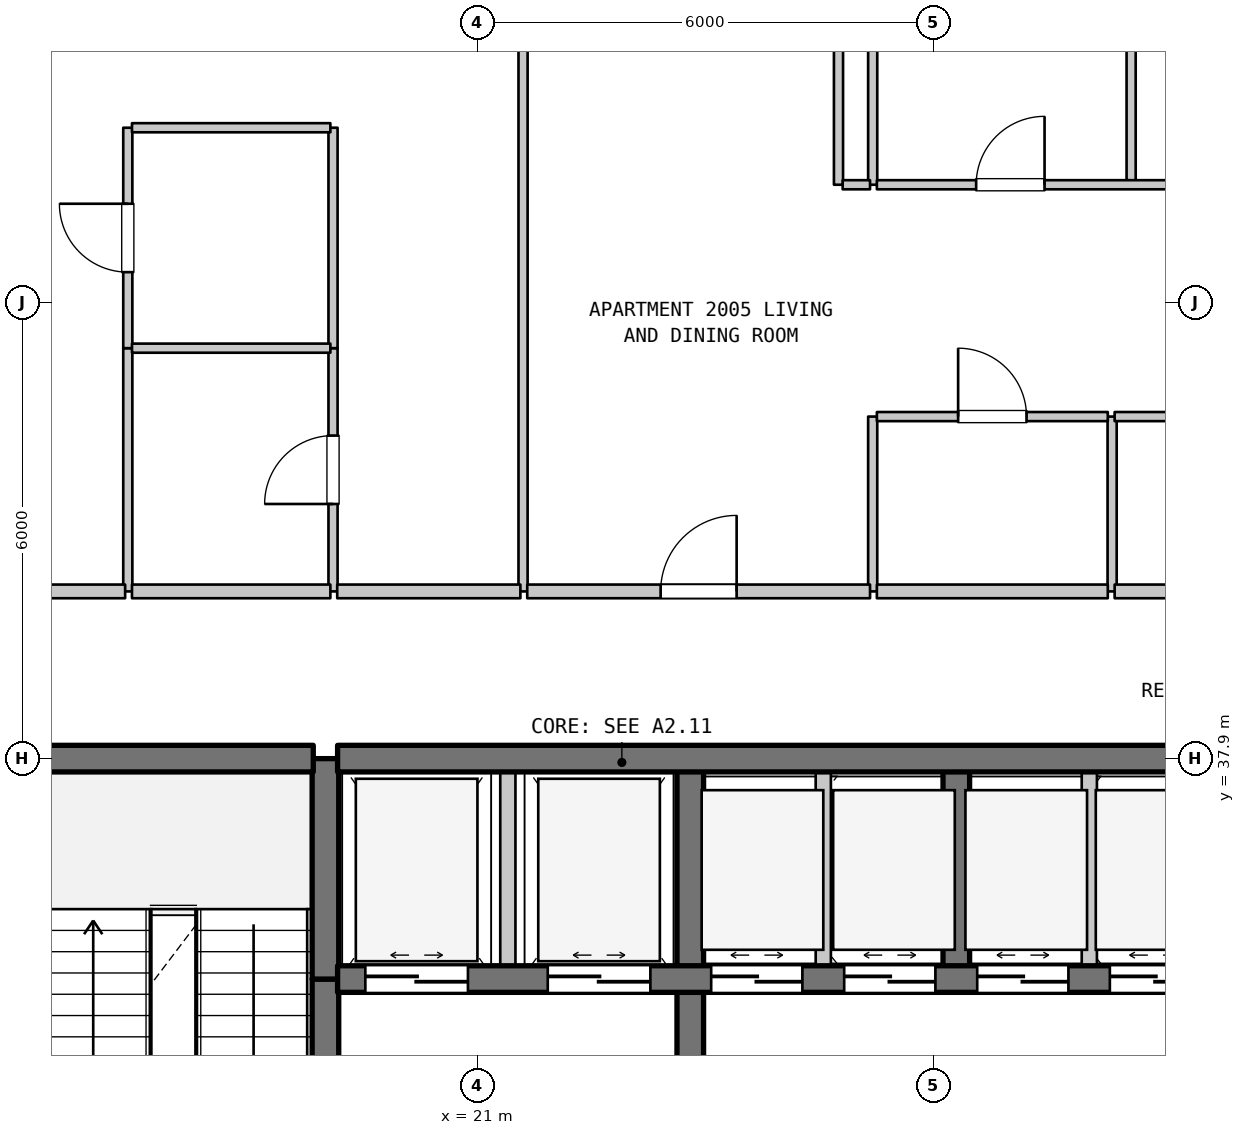
"""IFC4 building model, lengths in metres.
Left out: names, types, materials, properties, quantities, classifications, styles, units other than length and angle.
Written with IfcOpenShell. Run it as: python <this file> out.ifc"""

import sys

from ifc_helpers import new_model, si_unit, direction, frame, frame_2d, origin, place, context, subcontext, project, spatial, rectangle, extrude, element, fill, save


model = new_model("IFC4")
c1 = context("Model", 3, precision=1e-05, world=origin(), true_north=direction((0.0, 1.0)))
c2 = subcontext(c1, "Body", "Model", "MODEL_VIEW")
j1 = project(units=[si_unit("LENGTHUNIT", "METRE"), si_unit("PLANEANGLEUNIT", "RADIAN")], contexts=[c1])
p1 = place(None, origin())
s1 = spatial("IfcSite", under=j1, at=p1, CompositionType="ELEMENT")
p2 = place(p1, origin())
s2 = spatial("IfcBuilding", under=s1, at=p2, CompositionType="ELEMENT")
p3 = place(p2, frame((0.0, 0.0, 86.4)))
s3 = spatial("IfcBuildingStorey", under=s2, at=p3, CompositionType="ELEMENT", Elevation=86.4)
p4 = place(p3, frame((16.4, 40.1, 0.0), z_axis=(0.0, 0.0, 1.0), x_axis=(0.0, 1.0, 0.0)))
e1 = element("IfcWall", 1, at=p4, inside=s3, PredefinedType="PARTITIONING", context=c2, shape_type="SweptSolid", body=[
    extrude(rectangle(XDim=3.2, YDim=0.12, at=frame_2d((1.6, 0.0))), origin(), (0.0, 0.0, 1.0), 4.185),
])
p5 = place(p3, frame((16.4, 43.3, 0.0), z_axis=(0.0, 0.0, 1.0), x_axis=(0.0, 1.0, 0.0)))
e2 = element("IfcWall", 2, at=p5, inside=s3, PredefinedType="PARTITIONING", context=c2, shape_type="SweptSolid", body=[
    extrude(rectangle(XDim=2.9, YDim=0.12, at=frame_2d((1.45, 0.0))), origin(), (0.0, 0.0, 1.0), 4.185),
])
p6 = place(p5, frame((1.0, 0.0, 0.0)))
e3 = element("IfcOpeningElement", 3, at=p6, cuts=e2, PredefinedType="OPENING", context=c2, shape_type="SweptSolid", body=[
    extrude(rectangle(XDim=0.9, YDim=2.1, at=frame_2d((0.45, 1.05))), frame((0.0, 0.07, 0.0), z_axis=(0.0, -1.0, 0.0), x_axis=(1.0, 0.0, 0.0)), (0.0, 0.0, 1.0), 0.14),
])
p7 = place(p3, frame((19.0, 29.5, 0.0), z_axis=(0.0, 0.0, 1.0), x_axis=(0.0, 1.0, 0.0)))
e4 = element("IfcWall", 4, at=p7, inside=s3, PredefinedType="SHEAR", context=c2, shape_type="SweptSolid", body=[
    extrude(rectangle(XDim=5.5, YDim=0.35, at=frame_2d((2.75, 0.0))), origin(), (0.0, 0.0, 1.0), 4.185),
])
p8 = place(p7, frame((2.025, 0.0, 0.0)))
e5 = element("IfcOpeningElement", 5, at=p8, cuts=e4, PredefinedType="OPENING", context=c2, shape_type="SweptSolid", body=[
    extrude(rectangle(XDim=1.1, YDim=2.15, at=frame_2d((0.55, 1.075))), frame((0.0, 0.185, 0.0), z_axis=(0.0, -1.0, 0.0), x_axis=(1.0, 0.0, 0.0)), (0.0, 0.0, 1.0), 0.37),
])
p9 = place(p3, frame((19.0, 35.0, 0.0), z_axis=(0.0, 0.0, 1.0), x_axis=(0.0, 1.0, 0.0)))
e6 = element("IfcWall", 6, at=p9, inside=s3, PredefinedType="SHEAR", context=c2, shape_type="SweptSolid", body=[
    extrude(rectangle(XDim=2.9, YDim=0.35, at=frame_2d((1.45, 0.0))), origin(), (0.0, 0.0, 1.0), 4.185),
])
p10 = place(p3, frame((19.1, 40.1, 0.0), z_axis=(0.0, 0.0, 1.0), x_axis=(0.0, 1.0, 0.0)))
e7 = element("IfcWall", 7, at=p10, inside=s3, PredefinedType="PARTITIONING", context=c2, shape_type="SweptSolid", body=[
    extrude(rectangle(XDim=3.2, YDim=0.12, at=frame_2d((1.6, 0.0))), origin(), (0.0, 0.0, 1.0), 4.185),
])
p11 = place(p10, frame((1.15, 0.0, 0.0)))
e8 = element("IfcOpeningElement", 8, at=p11, cuts=e7, PredefinedType="OPENING", context=c2, shape_type="SweptSolid", body=[
    extrude(rectangle(XDim=0.9, YDim=2.15, at=frame_2d((0.45, 1.075))), frame((0.0, 0.07, 0.0), z_axis=(0.0, -1.0, 0.0), x_axis=(1.0, 0.0, 0.0)), (0.0, 0.0, 1.0), 0.14),
])
p12 = place(p3, frame((19.1, 43.3, 0.0), z_axis=(0.0, 0.0, 1.0), x_axis=(0.0, 1.0, 0.0)))
e9 = element("IfcWall", 9, at=p12, inside=s3, PredefinedType="PARTITIONING", context=c2, shape_type="SweptSolid", body=[
    extrude(rectangle(XDim=2.9, YDim=0.12, at=frame_2d((1.45, 0.0))), origin(), (0.0, 0.0, 1.0), 4.185),
])
p13 = place(p3, frame((21.4, 35.0, 0.0), z_axis=(0.0, 0.0, 1.0), x_axis=(0.0, 1.0, 0.0)))
e10 = element("IfcWall", 10, at=p13, inside=s3, PredefinedType="STANDARD", context=c2, shape_type="SweptSolid", body=[
    extrude(rectangle(XDim=2.9, YDim=0.2, at=frame_2d((1.45, 0.0))), origin(), (0.0, 0.0, 1.0), 4.185),
])
p14 = place(p3, frame((21.6, 40.1, 0.0), z_axis=(0.0, 0.0, 1.0), x_axis=(0.0, 1.0, 0.0)))
e11 = element("IfcWall", 11, at=p14, inside=s3, PredefinedType="PARTITIONING", context=c2, shape_type="SweptSolid", body=[
    extrude(rectangle(XDim=13.79, YDim=0.12, at=frame_2d((6.895, 0.0))), origin(), (0.0, 0.0, 1.0), 4.185),
])
p15 = place(p3, frame((23.8, 31.5, 0.0), z_axis=(0.0, 0.0, 1.0), x_axis=(0.0, 1.0, 0.0)))
e12 = element("IfcWall", 12, at=p15, inside=s3, PredefinedType="SHEAR", context=c2, shape_type="SweptSolid", body=[
    extrude(rectangle(XDim=3.5, YDim=0.35, at=frame_2d((1.75, 0.0))), origin(), (0.0, 0.0, 1.0), 4.185),
])
p16 = place(p15, frame((1.127, 0.0, 0.0)))
e13 = element("IfcOpeningElement", 13, at=p16, cuts=e12, PredefinedType="OPENING", context=c2, shape_type="SweptSolid", body=[
    extrude(rectangle(XDim=1.1, YDim=2.15, at=frame_2d((0.55, 1.075))), frame((0.0, 0.185, 0.0), z_axis=(0.0, -1.0, 0.0), x_axis=(1.0, 0.0, 0.0)), (0.0, 0.0, 1.0), 0.37),
])
p17 = place(p3, frame((23.8, 35.0, 0.0), z_axis=(0.0, 0.0, 1.0), x_axis=(0.0, 1.0, 0.0)))
e14 = element("IfcWall", 14, at=p17, inside=s3, PredefinedType="SHEAR", context=c2, shape_type="SweptSolid", body=[
    extrude(rectangle(XDim=2.9, YDim=0.35, at=frame_2d((1.45, 0.0))), origin(), (0.0, 0.0, 1.0), 4.185),
])
p18 = place(p3, frame((25.55, 35.0, 0.0), z_axis=(0.0, 0.0, 1.0), x_axis=(0.0, 1.0, 0.0)))
e15 = element("IfcWall", 15, at=p18, inside=s3, PredefinedType="STANDARD", context=c2, shape_type="SweptSolid", body=[
    extrude(rectangle(XDim=2.9, YDim=0.2, at=frame_2d((1.45, 0.0))), origin(), (0.0, 0.0, 1.0), 4.185),
])
p19 = place(p3, frame((25.75, 45.45, 0.0), z_axis=(0.0, 0.0, 1.0), x_axis=(0.0, 1.0, 0.0)))
e16 = element("IfcWall", 16, at=p19, inside=s3, PredefinedType="PARTITIONING", context=c2, shape_type="SweptSolid", body=[
    extrude(rectangle(XDim=8.44, YDim=0.12, at=frame_2d((4.22, 0.0))), origin(), (0.0, 0.0, 1.0), 4.185),
])
p20 = place(p3, frame((26.2, 40.1, 0.0), z_axis=(0.0, 0.0, 1.0), x_axis=(0.0, 1.0, 0.0)))
e17 = element("IfcWall", 17, at=p20, inside=s3, PredefinedType="PARTITIONING", context=c2, shape_type="SweptSolid", body=[
    extrude(rectangle(XDim=2.3, YDim=0.12, at=frame_2d((1.15, 0.0))), origin(), (0.0, 0.0, 1.0), 4.185),
])
p21 = place(p3, frame((26.2, 45.45, 0.0), z_axis=(0.0, 0.0, 1.0), x_axis=(0.0, 1.0, 0.0)))
e18 = element("IfcWall", 18, at=p21, inside=s3, PredefinedType="PARTITIONING", context=c2, shape_type="SweptSolid", body=[
    extrude(rectangle(XDim=8.44, YDim=0.12, at=frame_2d((4.22, 0.0))), origin(), (0.0, 0.0, 1.0), 4.185),
])
p22 = place(p3, frame((27.3, 35.0, 0.0), z_axis=(0.0, 0.0, 1.0), x_axis=(0.0, 1.0, 0.0)))
e19 = element("IfcWall", 19, at=p22, inside=s3, PredefinedType="SHEAR", context=c2, shape_type="SweptSolid", body=[
    extrude(rectangle(XDim=2.9, YDim=0.35, at=frame_2d((1.45, 0.0))), origin(), (0.0, 0.0, 1.0), 4.185),
])
p23 = place(p3, frame((29.05, 35.0, 0.0), z_axis=(0.0, 0.0, 1.0), x_axis=(0.0, 1.0, 0.0)))
e20 = element("IfcWall", 20, at=p23, inside=s3, PredefinedType="STANDARD", context=c2, shape_type="SweptSolid", body=[
    extrude(rectangle(XDim=2.9, YDim=0.2, at=frame_2d((1.45, 0.0))), origin(), (0.0, 0.0, 1.0), 4.185),
])
p24 = place(p3, frame((29.35, 40.1, 0.0), z_axis=(0.0, 0.0, 1.0), x_axis=(0.0, 1.0, 0.0)))
e21 = element("IfcWall", 21, at=p24, inside=s3, PredefinedType="PARTITIONING", context=c2, shape_type="SweptSolid", body=[
    extrude(rectangle(XDim=2.3, YDim=0.12, at=frame_2d((1.15, 0.0))), origin(), (0.0, 0.0, 1.0), 4.185),
])
p25 = place(p3, frame((29.6, 45.45, 0.0), z_axis=(0.0, 0.0, 1.0), x_axis=(0.0, 1.0, 0.0)))
e22 = element("IfcWall", 22, at=p25, inside=s3, PredefinedType="PARTITIONING", context=c2, shape_type="SweptSolid", body=[
    extrude(rectangle(XDim=8.44, YDim=0.12, at=frame_2d((4.22, 0.0))), origin(), (0.0, 0.0, 1.0), 4.185),
])
p26 = place(p3, frame((19.16, 35.0, 0.0), z_axis=(0.0, 0.0, 1.0), x_axis=(1.0, 0.0, 0.0)))
e23 = element("IfcWall", 23, at=p26, inside=s3, PredefinedType="SHEAR", context=c2, shape_type="SweptSolid", body=[
    extrude(rectangle(XDim=11.48, YDim=0.35, at=frame_2d((5.74, 0.0))), origin(), (0.0, 0.0, 1.0), 4.185),
])
p27 = place(p26, frame((0.365, 0.0, 0.0)))
e24 = element("IfcOpeningElement", 24, at=p27, cuts=e23, PredefinedType="OPENING", context=c2, shape_type="SweptSolid", body=[
    extrude(rectangle(XDim=1.35, YDim=2.2, at=frame_2d((0.675, 1.1))), frame((0.0, 0.185, 0.0), z_axis=(0.0, -1.0, 0.0), x_axis=(1.0, 0.0, 0.0)), (0.0, 0.0, 1.0), 0.37),
])
p28 = place(p26, frame((2.765, 0.0, 0.0)))
e25 = element("IfcOpeningElement", 25, at=p28, cuts=e23, PredefinedType="OPENING", context=c2, shape_type="SweptSolid", body=[
    extrude(rectangle(XDim=1.35, YDim=2.2, at=frame_2d((0.675, 1.1))), frame((0.0, 0.185, 0.0), z_axis=(0.0, -1.0, 0.0), x_axis=(1.0, 0.0, 0.0)), (0.0, 0.0, 1.0), 0.37),
])
p29 = place(p26, frame((4.915, 0.0, 0.0)))
e26 = element("IfcOpeningElement", 26, at=p29, cuts=e23, PredefinedType="OPENING", context=c2, shape_type="SweptSolid", body=[
    extrude(rectangle(XDim=1.2, YDim=2.2, at=frame_2d((0.6, 1.1))), frame((0.0, 0.185, 0.0), z_axis=(0.0, -1.0, 0.0), x_axis=(1.0, 0.0, 0.0)), (0.0, 0.0, 1.0), 0.37),
])
p30 = place(p26, frame((6.665, 0.0, 0.0)))
e27 = element("IfcOpeningElement", 27, at=p30, cuts=e23, PredefinedType="OPENING", context=c2, shape_type="SweptSolid", body=[
    extrude(rectangle(XDim=1.2, YDim=2.2, at=frame_2d((0.6, 1.1))), frame((0.0, 0.185, 0.0), z_axis=(0.0, -1.0, 0.0), x_axis=(1.0, 0.0, 0.0)), (0.0, 0.0, 1.0), 0.37),
])
p31 = place(p26, frame((8.415, 0.0, 0.0)))
e28 = element("IfcOpeningElement", 28, at=p31, cuts=e23, PredefinedType="OPENING", context=c2, shape_type="SweptSolid", body=[
    extrude(rectangle(XDim=1.2, YDim=2.2, at=frame_2d((0.6, 1.1))), frame((0.0, 0.185, 0.0), z_axis=(0.0, -1.0, 0.0), x_axis=(1.0, 0.0, 0.0)), (0.0, 0.0, 1.0), 0.37),
])
p32 = place(p26, frame((10.16, 0.0, 0.0)))
e29 = element("IfcOpeningElement", 29, at=p32, cuts=e23, PredefinedType="OPENING", context=c2, shape_type="SweptSolid", body=[
    extrude(rectangle(XDim=1.2, YDim=2.2, at=frame_2d((0.6, 1.1))), frame((0.0, 0.185, 0.0), z_axis=(0.0, -1.0, 0.0), x_axis=(1.0, 0.0, 0.0)), (0.0, 0.0, 1.0), 0.37),
])
p33 = place(p3, frame((15.16, 37.9, 0.0), z_axis=(0.0, 0.0, 1.0), x_axis=(1.0, 0.0, 0.0)))
e30 = element("IfcWall", 30, at=p33, inside=s3, PredefinedType="SHEAR", context=c2, shape_type="SweptSolid", body=[
    extrude(rectangle(XDim=3.68, YDim=0.35, at=frame_2d((1.84, 0.0))), origin(), (0.0, 0.0, 1.0), 4.185),
])
p34 = place(p3, frame((19.16, 37.9, 0.0), z_axis=(0.0, 0.0, 1.0), x_axis=(1.0, 0.0, 0.0)))
e31 = element("IfcWall", 31, at=p34, inside=s3, PredefinedType="SHEAR", context=c2, shape_type="SweptSolid", body=[
    extrude(rectangle(XDim=11.48, YDim=0.35, at=frame_2d((5.74, 0.0))), origin(), (0.0, 0.0, 1.0), 4.185),
])
p35 = place(p3, frame((12.875, 40.1, 0.0), z_axis=(0.0, 0.0, 1.0), x_axis=(1.0, 0.0, 0.0)))
e32 = element("IfcWall", 32, at=p35, inside=s3, PredefinedType="STANDARD", context=c2, shape_type="SweptSolid", body=[
    extrude(rectangle(XDim=3.49, YDim=0.18, at=frame_2d((1.745, 0.0))), origin(), (0.0, 0.0, 1.0), 4.185),
])
p36 = place(p35, frame((1.16, 0.0, 0.0)))
e33 = element("IfcOpeningElement", 33, at=p36, cuts=e32, PredefinedType="OPENING", context=c2, shape_type="SweptSolid", body=[
    extrude(rectangle(XDim=1.0, YDim=2.15, at=frame_2d((0.5, 1.075))), frame((0.0, 0.1, 0.0), z_axis=(0.0, -1.0, 0.0), x_axis=(1.0, 0.0, 0.0)), (0.0, 0.0, 1.0), 0.2),
])
p37 = place(p3, frame((16.455, 40.1, 0.0), z_axis=(0.0, 0.0, 1.0), x_axis=(1.0, 0.0, 0.0)))
e34 = element("IfcWall", 34, at=p37, inside=s3, PredefinedType="STANDARD", context=c2, shape_type="SweptSolid", body=[
    extrude(rectangle(XDim=2.61, YDim=0.18, at=frame_2d((1.305, 0.0))), origin(), (0.0, 0.0, 1.0), 4.185),
])
p38 = place(p3, frame((19.155, 40.1, 0.0), z_axis=(0.0, 0.0, 1.0), x_axis=(1.0, 0.0, 0.0)))
e35 = element("IfcWall", 35, at=p38, inside=s3, PredefinedType="STANDARD", context=c2, shape_type="SweptSolid", body=[
    extrude(rectangle(XDim=2.41, YDim=0.18, at=frame_2d((1.205, 0.0))), origin(), (0.0, 0.0, 1.0), 4.185),
])
p39 = place(p3, frame((21.655, 40.1, 0.0), z_axis=(0.0, 0.0, 1.0), x_axis=(1.0, 0.0, 0.0)))
e36 = element("IfcWall", 36, at=p39, inside=s3, PredefinedType="STANDARD", context=c2, shape_type="SweptSolid", body=[
    extrude(rectangle(XDim=4.51, YDim=0.18, at=frame_2d((2.255, 0.0))), origin(), (0.0, 0.0, 1.0), 4.185),
])
p40 = place(p39, frame((1.755, 0.0, 0.0)))
e37 = element("IfcOpeningElement", 37, at=p40, cuts=e36, PredefinedType="OPENING", context=c2, shape_type="SweptSolid", body=[
    extrude(rectangle(XDim=1.0, YDim=2.15, at=frame_2d((0.5, 1.075))), frame((0.0, 0.1, 0.0), z_axis=(0.0, -1.0, 0.0), x_axis=(1.0, 0.0, 0.0)), (0.0, 0.0, 1.0), 0.2),
])
p41 = place(p3, frame((26.255, 40.1, 0.0), z_axis=(0.0, 0.0, 1.0), x_axis=(1.0, 0.0, 0.0)))
e38 = element("IfcWall", 38, at=p41, inside=s3, PredefinedType="STANDARD", context=c2, shape_type="SweptSolid", body=[
    extrude(rectangle(XDim=3.038, YDim=0.18, at=frame_2d((1.519, 0.0))), origin(), (0.0, 0.0, 1.0), 4.185),
])
p42 = place(p3, frame((29.383, 40.1, 0.0), z_axis=(0.0, 0.0, 1.0), x_axis=(1.0, 0.0, 0.0)))
e39 = element("IfcWall", 39, at=p42, inside=s3, PredefinedType="STANDARD", context=c2, shape_type="SweptSolid", body=[
    extrude(rectangle(XDim=3.582, YDim=0.18, at=frame_2d((1.791, 0.0))), origin(), (0.0, 0.0, 1.0), 4.185),
])
p43 = place(p3, frame((26.255, 42.4, 0.0), z_axis=(0.0, 0.0, 1.0), x_axis=(1.0, 0.0, 0.0)))
e40 = element("IfcWall", 40, at=p43, inside=s3, PredefinedType="PARTITIONING", context=c2, shape_type="SweptSolid", body=[
    extrude(rectangle(XDim=3.038, YDim=0.12, at=frame_2d((1.519, 0.0))), origin(), (0.0, 0.0, 1.0), 4.185),
])
p44 = place(p43, frame((1.069, 0.0, 0.0)))
e41 = element("IfcOpeningElement", 41, at=p44, cuts=e40, PredefinedType="OPENING", context=c2, shape_type="SweptSolid", body=[
    extrude(rectangle(XDim=0.9, YDim=2.15, at=frame_2d((0.45, 1.075))), frame((0.0, 0.07, 0.0), z_axis=(0.0, -1.0, 0.0), x_axis=(1.0, 0.0, 0.0)), (0.0, 0.0, 1.0), 0.14),
])
p45 = place(p3, frame((29.383, 42.4, 0.0), z_axis=(0.0, 0.0, 1.0), x_axis=(1.0, 0.0, 0.0)))
e42 = element("IfcWall", 42, at=p45, inside=s3, PredefinedType="PARTITIONING", context=c2, shape_type="SweptSolid", body=[
    extrude(rectangle(XDim=3.582, YDim=0.12, at=frame_2d((1.791, 0.0))), origin(), (0.0, 0.0, 1.0), 4.185),
])
p46 = place(p45, frame((1.341, 0.0, 0.0)))
e43 = element("IfcOpeningElement", 43, at=p46, cuts=e42, PredefinedType="OPENING", context=c2, shape_type="SweptSolid", body=[
    extrude(rectangle(XDim=0.9, YDim=2.1, at=frame_2d((0.45, 1.05))), frame((0.0, 0.07, 0.0), z_axis=(0.0, -1.0, 0.0), x_axis=(1.0, 0.0, 0.0)), (0.0, 0.0, 1.0), 0.14),
])
p47 = place(p3, frame((16.455, 43.3, 0.0), z_axis=(0.0, 0.0, 1.0), x_axis=(1.0, 0.0, 0.0)))
e44 = element("IfcWall", 44, at=p47, inside=s3, PredefinedType="PARTITIONING", context=c2, shape_type="SweptSolid", body=[
    extrude(rectangle(XDim=2.61, YDim=0.12, at=frame_2d((1.305, 0.0))), origin(), (0.0, 0.0, 1.0), 4.185),
])
p48 = place(p3, frame((25.805, 45.45, 0.0), z_axis=(0.0, 0.0, 1.0), x_axis=(1.0, 0.0, 0.0)))
e45 = element("IfcWall", 45, at=p48, inside=s3, PredefinedType="PARTITIONING", context=c2, shape_type="SweptSolid", body=[
    extrude(rectangle(XDim=0.36, YDim=0.12, at=frame_2d((0.18, 0.0))), origin(), (0.0, 0.0, 1.0), 4.185),
])
p49 = place(p3, frame((26.255, 45.45, 0.0), z_axis=(0.0, 0.0, 1.0), x_axis=(1.0, 0.0, 0.0)))
e46 = element("IfcWall", 46, at=p49, inside=s3, PredefinedType="PARTITIONING", context=c2, shape_type="SweptSolid", body=[
    extrude(rectangle(XDim=6.71, YDim=0.12, at=frame_2d((3.355, 0.0))), origin(), (0.0, 0.0, 1.0), 4.185),
])
p50 = place(p49, frame((1.306, 0.0, 0.0)))
e47 = element("IfcOpeningElement", 47, at=p50, cuts=e46, PredefinedType="OPENING", context=c2, shape_type="SweptSolid", body=[
    extrude(rectangle(XDim=0.9, YDim=2.15, at=frame_2d((0.45, 1.075))), frame((0.0, 0.07, 0.0), z_axis=(0.0, -1.0, 0.0), x_axis=(1.0, 0.0, 0.0)), (0.0, 0.0, 1.0), 0.14),
])
p51 = place(p49, frame((4.356, 0.0, 0.0)))
e48 = element("IfcOpeningElement", 48, at=p51, cuts=e46, PredefinedType="OPENING", context=c2, shape_type="SweptSolid", body=[
    extrude(rectangle(XDim=0.9, YDim=2.15, at=frame_2d((0.45, 1.075))), frame((0.0, 0.07, 0.0), z_axis=(0.0, -1.0, 0.0), x_axis=(1.0, 0.0, 0.0)), (0.0, 0.0, 1.0), 0.14),
])
p52 = place(p3, frame((16.455, 46.2, 0.0), z_axis=(0.0, 0.0, 1.0), x_axis=(1.0, 0.0, 0.0)))
e49 = element("IfcWall", 49, at=p52, inside=s3, PredefinedType="PARTITIONING", context=c2, shape_type="SweptSolid", body=[
    extrude(rectangle(XDim=2.61, YDim=0.12, at=frame_2d((1.305, 0.0))), origin(), (0.0, 0.0, 1.0), 4.185),
])
p53 = place(p6, origin())
e50 = element("IfcDoor", 50, at=p53, inside=s3, OperationType="SINGLE_SWING_RIGHT", PredefinedType="DOOR", context=c2, shape_type="SweptSolid", body=[
    extrude(rectangle(XDim=0.9, YDim=2.1, at=frame_2d((0.45, 1.05))), frame((0.0, 0.025, 0.0), z_axis=(0.0, -1.0, 0.0), x_axis=(1.0, 0.0, 0.0)), (0.0, 0.0, 1.0), 0.05),
])
fill(e3, e50)
p54 = place(p11, origin())
e51 = element("IfcDoor", 51, at=p54, inside=s3, OperationType="SINGLE_SWING_LEFT", PredefinedType="DOOR", context=c2, shape_type="SweptSolid", body=[
    extrude(rectangle(XDim=0.9, YDim=2.15, at=frame_2d((0.45, 1.075))), frame((0.0, 0.025, 0.0), z_axis=(0.0, -1.0, 0.0), x_axis=(1.0, 0.0, 0.0)), (0.0, 0.0, 1.0), 0.05),
])
fill(e8, e51)
p55 = place(p27, origin())
e52 = element("IfcDoor", 52, at=p55, inside=s3, OperationType="DOUBLE_DOOR_SLIDING", PredefinedType="DOOR", context=c2, shape_type="SweptSolid", body=[
    extrude(rectangle(XDim=1.35, YDim=2.2, at=frame_2d((0.675, 1.1))), frame((0.0, 0.025, 0.0), z_axis=(0.0, -1.0, 0.0), x_axis=(1.0, 0.0, 0.0)), (0.0, 0.0, 1.0), 0.05),
])
fill(e24, e52)
p56 = place(p28, origin())
e53 = element("IfcDoor", 53, at=p56, inside=s3, OperationType="DOUBLE_DOOR_SLIDING", PredefinedType="DOOR", context=c2, shape_type="SweptSolid", body=[
    extrude(rectangle(XDim=1.35, YDim=2.2, at=frame_2d((0.675, 1.1))), frame((0.0, 0.025, 0.0), z_axis=(0.0, -1.0, 0.0), x_axis=(1.0, 0.0, 0.0)), (0.0, 0.0, 1.0), 0.05),
])
fill(e25, e53)
p57 = place(p29, origin())
e54 = element("IfcDoor", 54, at=p57, inside=s3, OperationType="DOUBLE_DOOR_SLIDING", PredefinedType="DOOR", context=c2, shape_type="SweptSolid", body=[
    extrude(rectangle(XDim=1.2, YDim=2.2, at=frame_2d((0.6, 1.1))), frame((0.0, 0.025, 0.0), z_axis=(0.0, -1.0, 0.0), x_axis=(1.0, 0.0, 0.0)), (0.0, 0.0, 1.0), 0.05),
])
fill(e26, e54)
p58 = place(p30, origin())
e55 = element("IfcDoor", 55, at=p58, inside=s3, OperationType="DOUBLE_DOOR_SLIDING", PredefinedType="DOOR", context=c2, shape_type="SweptSolid", body=[
    extrude(rectangle(XDim=1.2, YDim=2.2, at=frame_2d((0.6, 1.1))), frame((0.0, 0.025, 0.0), z_axis=(0.0, -1.0, 0.0), x_axis=(1.0, 0.0, 0.0)), (0.0, 0.0, 1.0), 0.05),
])
fill(e27, e55)
p59 = place(p31, origin())
e56 = element("IfcDoor", 56, at=p59, inside=s3, OperationType="DOUBLE_DOOR_SLIDING", PredefinedType="DOOR", context=c2, shape_type="SweptSolid", body=[
    extrude(rectangle(XDim=1.2, YDim=2.2, at=frame_2d((0.6, 1.1))), frame((0.0, 0.025, 0.0), z_axis=(0.0, -1.0, 0.0), x_axis=(1.0, 0.0, 0.0)), (0.0, 0.0, 1.0), 0.05),
])
fill(e28, e56)
p60 = place(p32, origin())
e57 = element("IfcDoor", 57, at=p60, inside=s3, OperationType="DOUBLE_DOOR_SLIDING", PredefinedType="DOOR", context=c2, shape_type="SweptSolid", body=[
    extrude(rectangle(XDim=1.2, YDim=2.2, at=frame_2d((0.6, 1.1))), frame((0.0, 0.025, 0.0), z_axis=(0.0, -1.0, 0.0), x_axis=(1.0, 0.0, 0.0)), (0.0, 0.0, 1.0), 0.05),
])
fill(e29, e57)
p61 = place(p40, origin())
e58 = element("IfcDoor", 58, at=p61, inside=s3, OperationType="SINGLE_SWING_RIGHT", PredefinedType="DOOR", context=c2, shape_type="SweptSolid", body=[
    extrude(rectangle(XDim=1.0, YDim=2.15, at=frame_2d((0.5, 1.075))), frame((0.0, 0.025, 0.0), z_axis=(0.0, -1.0, 0.0), x_axis=(1.0, 0.0, 0.0)), (0.0, 0.0, 1.0), 0.05),
])
fill(e37, e58)
p62 = place(p44, origin())
e59 = element("IfcDoor", 59, at=p62, inside=s3, OperationType="SINGLE_SWING_LEFT", PredefinedType="DOOR", context=c2, shape_type="SweptSolid", body=[
    extrude(rectangle(XDim=0.9, YDim=2.15, at=frame_2d((0.45, 1.075))), frame((0.0, 0.025, 0.0), z_axis=(0.0, -1.0, 0.0), x_axis=(1.0, 0.0, 0.0)), (0.0, 0.0, 1.0), 0.05),
])
fill(e41, e59)
p63 = place(p50, origin())
e60 = element("IfcDoor", 60, at=p63, inside=s3, OperationType="SINGLE_SWING_RIGHT", PredefinedType="DOOR", context=c2, shape_type="SweptSolid", body=[
    extrude(rectangle(XDim=0.9, YDim=2.15, at=frame_2d((0.45, 1.075))), frame((0.0, 0.025, 0.0), z_axis=(0.0, -1.0, 0.0), x_axis=(1.0, 0.0, 0.0)), (0.0, 0.0, 1.0), 0.05),
])
fill(e47, e60)
save(model, sys.argv[1])
